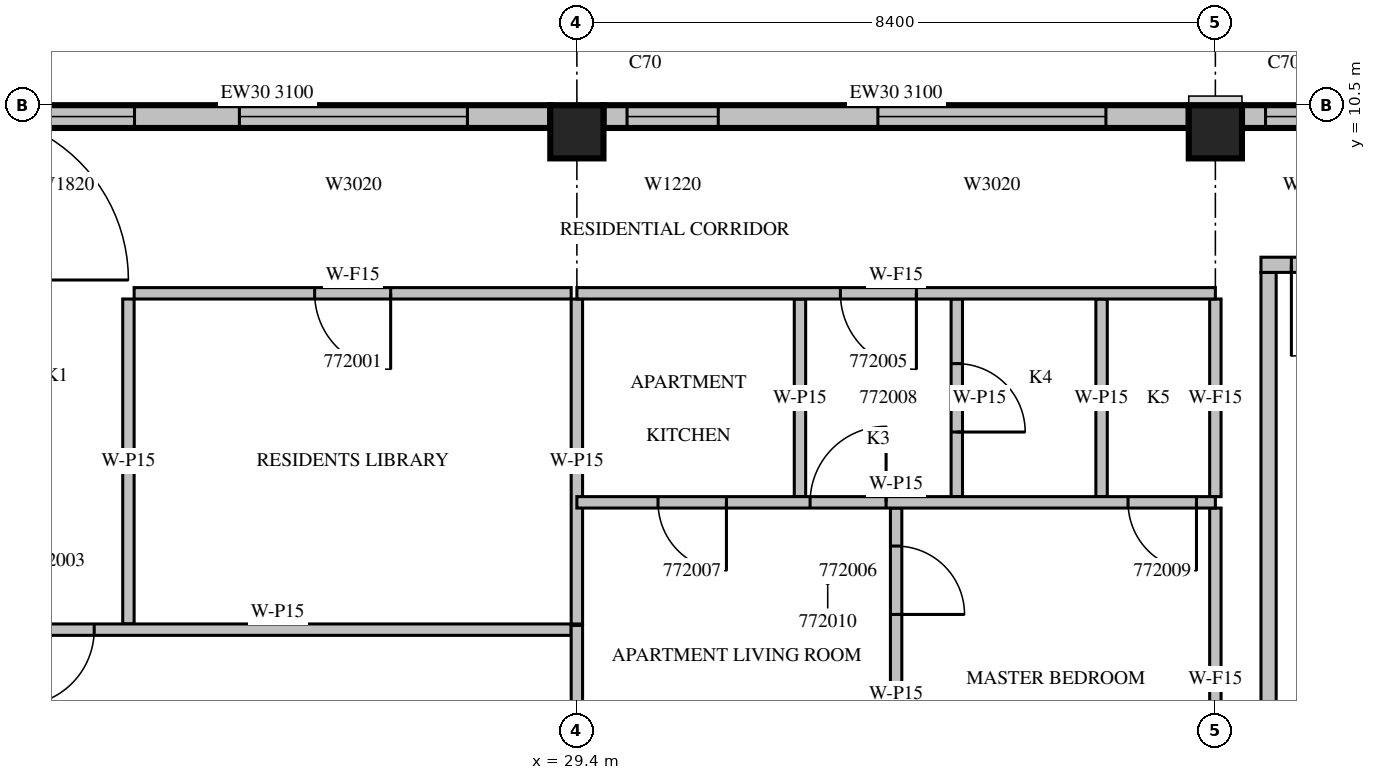
"""IFC4 building model, lengths in metres.
Left out: names, types, materials, properties, quantities, classifications, styles, units other than length and angle.
Written with IfcOpenShell. Run it as: python <this file> out.ifc"""

import sys

from ifc_helpers import new_model, si_unit, direction, frame, frame_2d, origin, origin_2d, place, context, subcontext, project, spatial, rectangle, extrude, source, transform, mapped, element, fill, save


model = new_model("IFC4")
c1 = context("Model", 3, precision=1e-05, world=origin(), true_north=direction((0.0, 1.0)))
c2 = subcontext(c1, "Body", "Model", "MODEL_VIEW")
j1 = project(units=[si_unit("LENGTHUNIT", "METRE"), si_unit("PLANEANGLEUNIT", "RADIAN")], contexts=[c1])
p1 = place(None, origin())
s1 = spatial("IfcSite", under=j1, at=p1, CompositionType="ELEMENT")
p2 = place(p1, origin())
s2 = spatial("IfcBuilding", under=s1, at=p2, CompositionType="ELEMENT")
p3 = place(p2, frame((0.0, 0.0, 312.5)))
s3 = spatial("IfcBuildingStorey", under=s2, at=p3, CompositionType="ELEMENT", Elevation=312.5)
m1 = source(origin(), c2, "Body", "SweptSolid", [
    extrude(rectangle(XDim=0.7, YDim=0.7, at=origin_2d()), origin(), (0.0, 0.0, 1.0), 3.5),
])
for number, where, z_axis, x_axis in (
    (1, (29.4, 10.15, 0.0), (0.0, 0.0, 1.0), (1.0, 0.0, 0.0)),
    (2, (37.8, 10.15, 0.0), (0.0, 0.0, 1.0), (1.0, 0.0, 0.0)),
):
    element("IfcColumn", number, at=place(p3, frame(where, z_axis=z_axis, x_axis=x_axis)), inside=s3, PredefinedType="COLUMN", context=c2, shape_type="MappedRepresentation", body=[
        mapped(m1, transform((0.0, 0.0, 0.0), scale=1.0)),
    ])
m2 = source(origin(), c2, "Body", "SweptSolid", [
    extrude(rectangle(XDim=7.7, YDim=0.3, at=frame_2d((3.85, 0.0))), origin(), (0.0, 0.0, 1.0), 3.1),
])
p4 = place(p3, frame((45.85, 10.35, 0.0), z_axis=(0.0, 0.0, 1.0), x_axis=(-1.0, 0.0, 0.0)))
e3 = element("IfcWall", 3, at=p4, inside=s3, PredefinedType="STANDARD", context=c2, shape_type="MappedRepresentation", body=[
    mapped(m2, transform((0.0, 0.0, 0.0), scale=1.0)),
])
m3 = source(origin(), c2, "Body", "SweptSolid", [
    extrude(rectangle(XDim=3.0, YDim=2.0, at=frame_2d((1.5, 1.0))), frame((0.0, 0.16, 0.0), z_axis=(0.0, -1.0, 0.0), x_axis=(1.0, 0.0, 0.0)), (0.0, 0.0, 1.0), 0.32),
])
p5 = place(p4, frame((1.09, 0.0, 0.6)))
e4 = element("IfcOpeningElement", 4, at=p5, cuts=e3, PredefinedType="OPENING", context=c2, shape_type="MappedRepresentation", body=[
    mapped(m3, transform((0.0, 0.0, 0.0), scale=1.0)),
])
m4 = source(origin(), c2, "Body", "SweptSolid", [
    extrude(rectangle(XDim=1.2, YDim=2.0, at=frame_2d((0.6, 1.0))), frame((0.0, 0.16, 0.0), z_axis=(0.0, -1.0, 0.0), x_axis=(1.0, 0.0, 0.0)), (0.0, 0.0, 1.0), 0.32),
])
p6 = place(p4, frame((6.19, 0.0, 0.6)))
e5 = element("IfcOpeningElement", 5, at=p6, cuts=e3, PredefinedType="OPENING", context=c2, shape_type="MappedRepresentation", body=[
    mapped(m4, transform((0.0, 0.0, 0.0), scale=1.0)),
])
p7 = place(p3, frame((37.45, 10.35, 0.0), z_axis=(0.0, 0.0, 1.0), x_axis=(-1.0, 0.0, 0.0)))
e6 = element("IfcWall", 6, at=p7, inside=s3, PredefinedType="STANDARD", context=c2, shape_type="MappedRepresentation", body=[
    mapped(m2, transform((0.0, 0.0, 0.0), scale=1.0)),
])
p8 = place(p7, frame((1.09, 0.0, 0.6)))
e7 = element("IfcOpeningElement", 7, at=p8, cuts=e6, PredefinedType="OPENING", context=c2, shape_type="MappedRepresentation", body=[
    mapped(m3, transform((0.0, 0.0, 0.0), scale=1.0)),
])
p9 = place(p7, frame((6.19, 0.0, 0.6)))
e8 = element("IfcOpeningElement", 8, at=p9, cuts=e6, PredefinedType="OPENING", context=c2, shape_type="MappedRepresentation", body=[
    mapped(m4, transform((0.0, 0.0, 0.0), scale=1.0)),
])
m5 = source(origin(), c2, "Body", "SweptSolid", [
    extrude(rectangle(XDim=7.45, YDim=0.3, at=frame_2d((3.725, 0.0))), origin(), (0.0, 0.0, 1.0), 3.1),
])
p10 = place(p3, frame((29.05, 10.35, 0.0), z_axis=(0.0, 0.0, 1.0), x_axis=(-1.0, 0.0, 0.0)))
e9 = element("IfcWall", 9, at=p10, inside=s3, PredefinedType="STANDARD", context=c2, shape_type="MappedRepresentation", body=[
    mapped(m5, transform((0.0, 0.0, 0.0), scale=1.0)),
])
p11 = place(p10, frame((1.09, 0.0, 0.6)))
e10 = element("IfcOpeningElement", 10, at=p11, cuts=e9, PredefinedType="OPENING", context=c2, shape_type="MappedRepresentation", body=[
    mapped(m3, transform((0.0, 0.0, 0.0), scale=1.0)),
])
m6 = source(origin(), c2, "Body", "SweptSolid", [
    extrude(rectangle(XDim=1.8, YDim=2.0, at=frame_2d((0.9, 1.0))), frame((0.0, 0.16, 0.0), z_axis=(0.0, -1.0, 0.0), x_axis=(1.0, 0.0, 0.0)), (0.0, 0.0, 1.0), 0.32),
])
p12 = place(p10, frame((5.47, 0.0, 0.6)))
e11 = element("IfcOpeningElement", 11, at=p12, cuts=e9, PredefinedType="OPENING", context=c2, shape_type="MappedRepresentation", body=[
    mapped(m6, transform((0.0, 0.0, 0.0), scale=1.0)),
])
m7 = source(origin(), c2, "Body", "SweptSolid", [
    extrude(rectangle(XDim=8.0, YDim=0.2, at=frame_2d((4.0, 0.0))), origin(), (0.0, 0.0, 1.0), 3.1),
])
p13 = place(p3, frame((38.5, 0.3, 0.0), z_axis=(0.0, 0.0, 1.0), x_axis=(0.0, 1.0, 0.0)))
e12 = element("IfcWall", 12, at=p13, inside=s3, PredefinedType="PARTITIONING", context=c2, shape_type="MappedRepresentation", body=[
    mapped(m7, transform((0.0, 0.0, 0.0), scale=1.0)),
])
m8 = source(origin(), c2, "Body", "SweptSolid", [
    extrude(rectangle(XDim=5.45, YDim=0.2, at=frame_2d((2.725, 0.0))), origin(), (0.0, 0.0, 1.0), 3.1),
])
p14 = place(p3, frame((38.4, 8.4, 0.0), z_axis=(0.0, 0.0, 1.0), x_axis=(1.0, 0.0, 0.0)))
e13 = element("IfcWall", 13, at=p14, inside=s3, PredefinedType="PARTITIONING", context=c2, shape_type="MappedRepresentation", body=[
    mapped(m8, transform((0.0, 0.0, 0.0), scale=1.0)),
])
m9 = source(origin(), c2, "Body", "SweptSolid", [
    extrude(rectangle(XDim=1.2, YDim=2.1, at=frame_2d((0.6, 1.05))), frame((0.0, 0.11, 0.0), z_axis=(0.0, -1.0, 0.0), x_axis=(1.0, 0.0, 0.0)), (0.0, 0.0, 1.0), 0.22),
])
p15 = place(p14, frame((0.4, 0.0, 0.0)))
e14 = element("IfcOpeningElement", 14, at=p15, cuts=e13, PredefinedType="OPENING", context=c2, shape_type="MappedRepresentation", body=[
    mapped(m9, transform((0.0, 0.0, 0.0), scale=1.0)),
])
m10 = source(origin(), c2, "Body", "SweptSolid", [
    extrude(rectangle(XDim=0.9, YDim=2.1, at=frame_2d((0.45, 1.05))), frame((0.0, 0.11, 0.0), z_axis=(0.0, -1.0, 0.0), x_axis=(1.0, 0.0, 0.0)), (0.0, 0.0, 1.0), 0.22),
])
p16 = place(p14, frame((3.25, 0.0, 0.0)))
e15 = element("IfcOpeningElement", 15, at=p16, cuts=e13, PredefinedType="OPENING", context=c2, shape_type="MappedRepresentation", body=[
    mapped(m10, transform((0.0, 0.0, 0.0), scale=1.0)),
])
m11 = source(origin(), c2, "Body", "SweptSolid", [
    extrude(rectangle(XDim=4.275, YDim=0.15, at=frame_2d((2.138, 0.0))), origin(), (0.0, 0.0, 1.0), 3.1),
])
for number, where, z_axis, x_axis in (
    (16, (23.5, 7.95, 0.0), (0.0, 0.0, 1.0), (0.0, -1.0, 0.0)),
    (17, (29.4, 3.675, 0.0), (0.0, 0.0, 1.0), (0.0, 1.0, 0.0)),
):
    element("IfcWall", number, at=place(p3, frame(where, z_axis=z_axis, x_axis=x_axis)), inside=s3, PredefinedType="PARTITIONING", context=c2, shape_type="MappedRepresentation", body=[
        mapped(m11, transform((0.0, 0.0, 0.0), scale=1.0)),
    ])
m12 = source(origin(), c2, "Body", "SweptSolid", [
    extrude(rectangle(XDim=5.75, YDim=0.15, at=frame_2d((2.875, 0.0))), origin(), (0.0, 0.0, 1.0), 3.1),
])
p17 = place(p3, frame((29.325, 8.025, 0.0), z_axis=(0.0, 0.0, 1.0), x_axis=(-1.0, 0.0, 0.0)))
e18 = element("IfcWall", 18, at=p17, inside=s3, PredefinedType="PARTITIONING", context=c2, shape_type="MappedRepresentation", body=[
    mapped(m12, transform((0.0, 0.0, 0.0), scale=1.0)),
])
m13 = source(origin(), c2, "Body", "SweptSolid", [
    extrude(rectangle(XDim=1.0, YDim=2.1, at=frame_2d((0.5, 1.05))), frame((0.0, 0.085, 0.0), z_axis=(0.0, -1.0, 0.0), x_axis=(1.0, 0.0, 0.0)), (0.0, 0.0, 1.0), 0.17),
])
p18 = place(p17, frame((2.375, 0.0, 0.0)))
e19 = element("IfcOpeningElement", 19, at=p18, cuts=e18, PredefinedType="OPENING", context=c2, shape_type="MappedRepresentation", body=[
    mapped(m13, transform((0.0, 0.0, 0.0), scale=1.0)),
])
m14 = source(origin(), c2, "Body", "SweptSolid", [
    extrude(rectangle(XDim=7.725, YDim=0.15, at=frame_2d((3.862, 0.0))), origin(), (0.0, 0.0, 1.0), 3.1),
])
p19 = place(p3, frame((21.6, 3.6, 0.0), z_axis=(0.0, 0.0, 1.0), x_axis=(1.0, 0.0, 0.0)))
e20 = element("IfcWall", 20, at=p19, inside=s3, PredefinedType="PARTITIONING", context=c2, shape_type="MappedRepresentation", body=[
    mapped(m14, transform((0.0, 0.0, 0.0), scale=1.0)),
])
p20 = place(p19, frame((0.45, 0.0, 0.0)))
e21 = element("IfcOpeningElement", 21, at=p20, cuts=e20, PredefinedType="OPENING", context=c2, shape_type="MappedRepresentation", body=[
    mapped(m13, transform((0.0, 0.0, 0.0), scale=1.0)),
])
p21 = place(p3, frame((33.6, 0.3, 0.0), z_axis=(0.0, 0.0, 1.0), x_axis=(0.0, 1.0, 0.0)))
e22 = element("IfcWall", 22, at=p21, inside=s3, PredefinedType="PARTITIONING", context=c2, shape_type="SweptSolid", body=[
    extrude(rectangle(XDim=4.9, YDim=0.15, at=frame_2d((2.45, 0.0))), origin(), (0.0, 0.0, 1.0), 3.1),
])
m15 = source(origin(), c2, "Body", "SweptSolid", [
    extrude(rectangle(XDim=0.9, YDim=2.1, at=frame_2d((0.45, 1.05))), frame((0.0, 0.085, 0.0), z_axis=(0.0, -1.0, 0.0), x_axis=(1.0, 0.0, 0.0)), (0.0, 0.0, 1.0), 0.17),
])
p22 = place(p21, frame((3.5, 0.0, 0.0)))
e23 = element("IfcOpeningElement", 23, at=p22, cuts=e22, PredefinedType="OPENING", context=c2, shape_type="MappedRepresentation", body=[
    mapped(m15, transform((0.0, 0.0, 0.0), scale=1.0)),
])
p23 = place(p3, frame((32.335, 5.35, 0.0), z_axis=(0.0, 0.0, 1.0), x_axis=(0.0, 1.0, 0.0)))
e24 = element("IfcWall", 24, at=p23, inside=s3, PredefinedType="PARTITIONING", context=c2, shape_type="SweptSolid", body=[
    extrude(rectangle(XDim=2.6, YDim=0.15, at=frame_2d((1.3, 0.0))), origin(), (0.0, 0.0, 1.0), 3.1),
])
m16 = source(origin(), c2, "Body", "SweptSolid", [
    extrude(rectangle(XDim=2.6, YDim=0.15, at=frame_2d((1.3, 0.0))), origin(), (0.0, 0.0, 1.0), 3.1),
])
p24 = place(p3, frame((34.398, 5.35, 0.0), z_axis=(0.0, 0.0, 1.0), x_axis=(0.0, 1.0, 0.0)))
e25 = element("IfcWall", 25, at=p24, inside=s3, PredefinedType="PARTITIONING", context=c2, shape_type="MappedRepresentation", body=[
    mapped(m16, transform((0.0, 0.0, 0.0), scale=1.0)),
])
p25 = place(p24, frame((0.85, 0.0, 0.0)))
e26 = element("IfcOpeningElement", 26, at=p25, cuts=e25, PredefinedType="OPENING", context=c2, shape_type="MappedRepresentation", body=[
    mapped(m15, transform((0.0, 0.0, 0.0), scale=1.0)),
])
p26 = place(p3, frame((36.303, 5.35, 0.0), z_axis=(0.0, 0.0, 1.0), x_axis=(0.0, 1.0, 0.0)))
e27 = element("IfcWall", 27, at=p26, inside=s3, PredefinedType="PARTITIONING", context=c2, shape_type="MappedRepresentation", body=[
    mapped(m16, transform((0.0, 0.0, 0.0), scale=1.0)),
])
m17 = source(origin(), c2, "Body", "SweptSolid", [
    extrude(rectangle(XDim=2.956, YDim=0.15, at=frame_2d((1.478, 0.0))), origin(), (0.0, 0.0, 1.0), 3.1),
])
p27 = place(p3, frame((29.4, 0.699, 0.0), z_axis=(0.0, 0.0, 1.0), x_axis=(0.0, 1.0, 0.0)))
e28 = element("IfcWall", 28, at=p27, inside=s3, PredefinedType="PARTITIONING", context=c2, shape_type="MappedRepresentation", body=[
    mapped(m17, transform((0.0, 0.0, 0.0), scale=1.0)),
])
p28 = place(p3, frame((37.8, 0.699, 0.0), z_axis=(0.0, 0.0, 1.0), x_axis=(0.0, 1.0, 0.0)))
e29 = element("IfcWall", 29, at=p28, inside=s3, PredefinedType="PARTITIONING", context=c2, shape_type="SweptSolid", body=[
    extrude(rectangle(XDim=4.501, YDim=0.15, at=frame_2d((2.251, 0.0))), origin(), (0.0, 0.0, 1.0), 3.1),
])
p29 = place(p3, frame((37.8, 5.35, 0.0), z_axis=(0.0, 0.0, 1.0), x_axis=(0.0, 1.0, 0.0)))
e30 = element("IfcWall", 30, at=p29, inside=s3, PredefinedType="PARTITIONING", context=c2, shape_type="MappedRepresentation", body=[
    mapped(m16, transform((0.0, 0.0, 0.0), scale=1.0)),
])
m18 = source(origin(), c2, "Body", "SweptSolid", [
    extrude(rectangle(XDim=8.4, YDim=0.15, at=frame_2d((4.2, 0.0))), origin(), (0.0, 0.0, 1.0), 3.1),
])
p30 = place(p3, frame((37.8, 5.275, 0.0), z_axis=(0.0, 0.0, 1.0), x_axis=(-1.0, 0.0, 0.0)))
e31 = element("IfcWall", 31, at=p30, inside=s3, PredefinedType="PARTITIONING", context=c2, shape_type="MappedRepresentation", body=[
    mapped(m18, transform((0.0, 0.0, 0.0), scale=1.0)),
])
p31 = place(p30, frame((4.332, 0.0, 0.0)))
e32 = element("IfcOpeningElement", 32, at=p31, cuts=e31, PredefinedType="OPENING", context=c2, shape_type="MappedRepresentation", body=[
    mapped(m13, transform((0.0, 0.0, 0.0), scale=1.0)),
])
p32 = place(p30, frame((6.433, 0.0, 0.0)))
e33 = element("IfcOpeningElement", 33, at=p32, cuts=e31, PredefinedType="OPENING", context=c2, shape_type="MappedRepresentation", body=[
    mapped(m15, transform((0.0, 0.0, 0.0), scale=1.0)),
])
p33 = place(p30, frame((0.248, 0.0, 0.0)))
e34 = element("IfcOpeningElement", 34, at=p33, cuts=e31, PredefinedType="OPENING", context=c2, shape_type="MappedRepresentation", body=[
    mapped(m15, transform((0.0, 0.0, 0.0), scale=1.0)),
])
p34 = place(p3, frame((37.8, 8.025, 0.0), z_axis=(0.0, 0.0, 1.0), x_axis=(-1.0, 0.0, 0.0)))
e35 = element("IfcWall", 35, at=p34, inside=s3, PredefinedType="PARTITIONING", context=c2, shape_type="MappedRepresentation", body=[
    mapped(m18, transform((0.0, 0.0, 0.0), scale=1.0)),
])
p35 = place(p34, frame((3.933, 0.0, 0.0)))
e36 = element("IfcOpeningElement", 36, at=p35, cuts=e35, PredefinedType="OPENING", context=c2, shape_type="MappedRepresentation", body=[
    mapped(m13, transform((0.0, 0.0, 0.0), scale=1.0)),
])
m19 = source(origin(), c2, "Body", "SweptSolid", [
    extrude(rectangle(XDim=1.2, YDim=2.0, at=frame_2d((0.6, 1.0))), frame((0.0, 0.03, 0.0), z_axis=(0.0, -1.0, 0.0), x_axis=(1.0, 0.0, 0.0)), (0.0, 0.0, 1.0), 0.06),
])
p36 = place(p6, origin())
e37 = element("IfcWindow", 37, at=p36, inside=s3, PartitioningType="SINGLE_PANEL", PredefinedType="WINDOW", context=c2, shape_type="MappedRepresentation", body=[
    mapped(m19, transform((0.0, 0.0, 0.0), scale=1.0)),
])
fill(e5, e37)
m20 = source(origin(), c2, "Body", "SweptSolid", [
    extrude(rectangle(XDim=3.0, YDim=2.0, at=frame_2d((1.5, 1.0))), frame((0.0, 0.03, 0.0), z_axis=(0.0, -1.0, 0.0), x_axis=(1.0, 0.0, 0.0)), (0.0, 0.0, 1.0), 0.06),
])
p37 = place(p8, origin())
e38 = element("IfcWindow", 38, at=p37, inside=s3, PartitioningType="SINGLE_PANEL", PredefinedType="WINDOW", context=c2, shape_type="MappedRepresentation", body=[
    mapped(m20, transform((0.0, 0.0, 0.0), scale=1.0)),
])
fill(e7, e38)
p38 = place(p9, origin())
e39 = element("IfcWindow", 39, at=p38, inside=s3, PartitioningType="SINGLE_PANEL", PredefinedType="WINDOW", context=c2, shape_type="MappedRepresentation", body=[
    mapped(m19, transform((0.0, 0.0, 0.0), scale=1.0)),
])
fill(e8, e39)
p39 = place(p11, origin())
e40 = element("IfcWindow", 40, at=p39, inside=s3, PartitioningType="SINGLE_PANEL", PredefinedType="WINDOW", context=c2, shape_type="MappedRepresentation", body=[
    mapped(m20, transform((0.0, 0.0, 0.0), scale=1.0)),
])
fill(e10, e40)
m21 = source(origin(), c2, "Body", "SweptSolid", [
    extrude(rectangle(XDim=1.8, YDim=2.0, at=frame_2d((0.9, 1.0))), frame((0.0, 0.03, 0.0), z_axis=(0.0, -1.0, 0.0), x_axis=(1.0, 0.0, 0.0)), (0.0, 0.0, 1.0), 0.06),
])
p40 = place(p12, origin())
e41 = element("IfcWindow", 41, at=p40, inside=s3, PartitioningType="SINGLE_PANEL", PredefinedType="WINDOW", context=c2, shape_type="MappedRepresentation", body=[
    mapped(m21, transform((0.0, 0.0, 0.0), scale=1.0)),
])
fill(e11, e41)
m22 = source(origin(), c2, "Body", "SweptSolid", [
    extrude(rectangle(XDim=1.2, YDim=2.1, at=frame_2d((0.6, 1.05))), frame((0.0, 0.025, 0.0), z_axis=(0.0, -1.0, 0.0), x_axis=(1.0, 0.0, 0.0)), (0.0, 0.0, 1.0), 0.05),
])
p41 = place(p15, origin())
e42 = element("IfcDoor", 42, at=p41, inside=s3, OperationType="SINGLE_SWING_RIGHT", PredefinedType="DOOR", context=c2, shape_type="MappedRepresentation", body=[
    mapped(m22, transform((0.0, 0.0, 0.0), scale=1.0)),
])
fill(e14, e42)
m23 = source(origin(), c2, "Body", "SweptSolid", [
    extrude(rectangle(XDim=1.0, YDim=2.1, at=frame_2d((0.5, 1.05))), frame((0.0, 0.025, 0.0), z_axis=(0.0, -1.0, 0.0), x_axis=(1.0, 0.0, 0.0)), (0.0, 0.0, 1.0), 0.05),
])
p42 = place(p18, origin())
e43 = element("IfcDoor", 43, at=p42, inside=s3, OperationType="SINGLE_SWING_LEFT", PredefinedType="DOOR", context=c2, shape_type="MappedRepresentation", body=[
    mapped(m23, transform((0.0, 0.0, 0.0), scale=1.0)),
])
fill(e19, e43)
p43 = place(p20, origin())
e44 = element("IfcDoor", 44, at=p43, inside=s3, OperationType="SINGLE_SWING_RIGHT", PredefinedType="DOOR", context=c2, shape_type="MappedRepresentation", body=[
    mapped(m23, transform((0.0, 0.0, 0.0), scale=1.0)),
])
fill(e21, e44)
p44 = place(p35, origin())
e45 = element("IfcDoor", 45, at=p44, inside=s3, OperationType="SINGLE_SWING_LEFT", PredefinedType="DOOR", context=c2, shape_type="MappedRepresentation", body=[
    mapped(m23, transform((0.0, 0.0, 0.0), scale=1.0)),
])
fill(e36, e45)
p45 = place(p31, origin())
e46 = element("IfcDoor", 46, at=p45, inside=s3, OperationType="SINGLE_SWING_RIGHT", PredefinedType="DOOR", context=c2, shape_type="MappedRepresentation", body=[
    mapped(m23, transform((0.0, 0.0, 0.0), scale=1.0)),
])
fill(e32, e46)
m24 = source(origin(), c2, "Body", "SweptSolid", [
    extrude(rectangle(XDim=0.9, YDim=2.1, at=frame_2d((0.45, 1.05))), frame((0.0, 0.025, 0.0), z_axis=(0.0, -1.0, 0.0), x_axis=(1.0, 0.0, 0.0)), (0.0, 0.0, 1.0), 0.05),
])
p46 = place(p32, origin())
e47 = element("IfcDoor", 47, at=p46, inside=s3, OperationType="SINGLE_SWING_LEFT", PredefinedType="DOOR", context=c2, shape_type="MappedRepresentation", body=[
    mapped(m24, transform((0.0, 0.0, 0.0), scale=1.0)),
])
fill(e33, e47)
p47 = place(p25, origin())
e48 = element("IfcDoor", 48, at=p47, inside=s3, OperationType="SINGLE_SWING_RIGHT", PredefinedType="DOOR", context=c2, shape_type="MappedRepresentation", body=[
    mapped(m24, transform((0.0, 0.0, 0.0), scale=1.0)),
])
fill(e26, e48)
p48 = place(p33, origin())
e49 = element("IfcDoor", 49, at=p48, inside=s3, OperationType="SINGLE_SWING_LEFT", PredefinedType="DOOR", context=c2, shape_type="MappedRepresentation", body=[
    mapped(m24, transform((0.0, 0.0, 0.0), scale=1.0)),
])
fill(e34, e49)
p49 = place(p22, origin())
e50 = element("IfcDoor", 50, at=p49, inside=s3, OperationType="SINGLE_SWING_RIGHT", PredefinedType="DOOR", context=c2, shape_type="MappedRepresentation", body=[
    mapped(m24, transform((0.0, 0.0, 0.0), scale=1.0)),
])
fill(e23, e50)
save(model, sys.argv[1])
